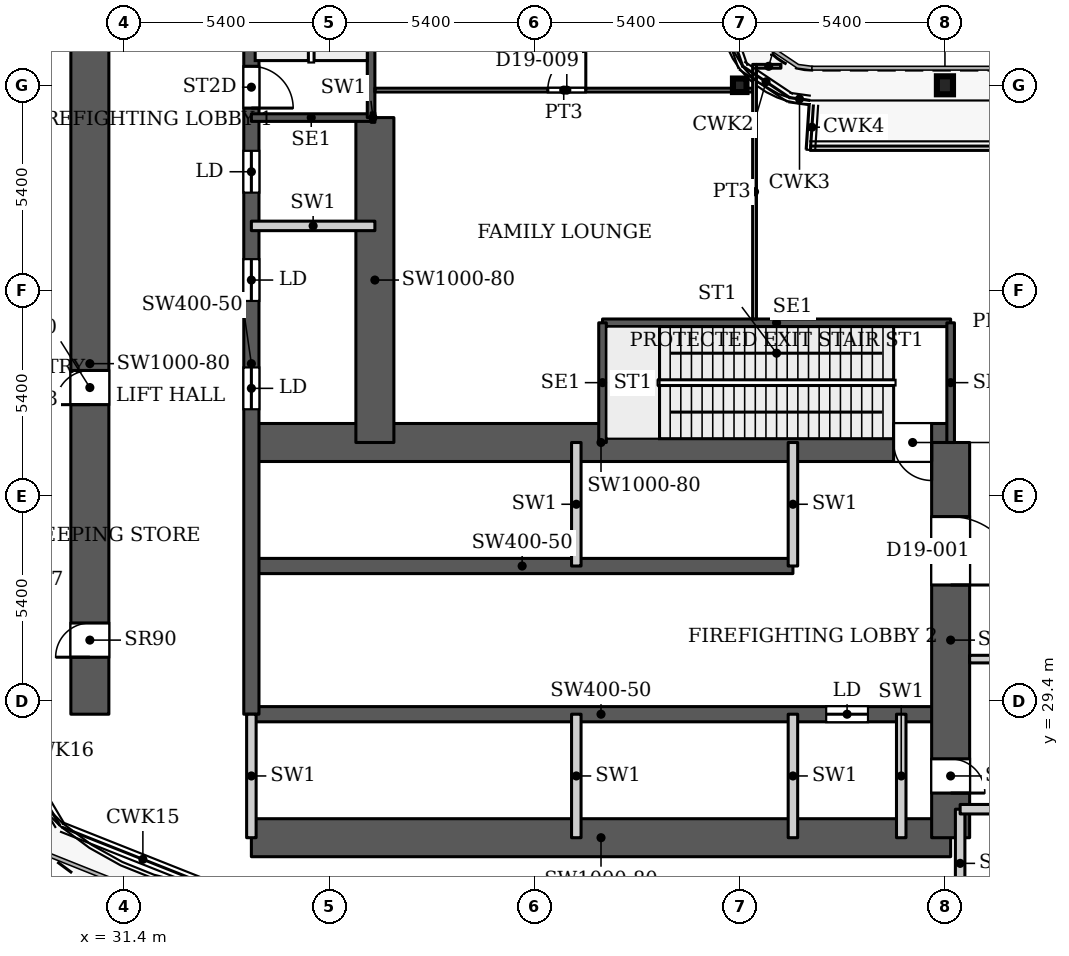
"""IFC4 building model, lengths in metres.
Left out: names, types, materials, properties, quantities, classifications, styles, units other than length and angle.
Written with IfcOpenShell. Run it as: python <this file> out.ifc"""

import sys

from ifc_helpers import new_model, si_unit, direction, frame, frame_2d, origin, origin_2d, place, context, subcontext, project, spatial, rectangle, hollow_rectangle, i_section, extrude, source, transform, mapped, element, fill, save


model = new_model("IFC4")
c1 = context("Model", 3, precision=1e-05, world=origin(), true_north=direction((0.0, 1.0)))
c2 = subcontext(c1, "Body", "Model", "MODEL_VIEW")
j1 = project(units=[si_unit("LENGTHUNIT", "METRE"), si_unit("PLANEANGLEUNIT", "RADIAN")], contexts=[c1])
p1 = place(None, origin())
s1 = spatial("IfcSite", under=j1, at=p1, CompositionType="ELEMENT")
p2 = place(p1, origin())
s2 = spatial("IfcBuilding", under=s1, at=p2, CompositionType="ELEMENT")
p3 = place(p2, frame((0.0, 0.0, 81.2)))
s3 = spatial("IfcBuildingStorey", under=s2, at=p3, CompositionType="ELEMENT", Elevation=81.2)
p4 = place(p3, frame((53.0, 45.6, 0.0), z_axis=(0.0, 0.0, 1.0), x_axis=(1.0, 0.0, 0.0)))
e1 = element("IfcColumn", 1, at=p4, inside=s3, PredefinedType="COLUMN", context=c2, shape_type="SweptSolid", body=[
    extrude(i_section(OverallWidth=0.424, OverallDepth=0.474, WebThickness=0.048, FlangeThickness=0.077, FilletRadius=0.014, at=origin_2d()), origin(), (0.0, 0.0, 1.0), 7.8),
])
p5 = place(p3, frame((47.6, 45.6, 0.0), z_axis=(0.0, 0.0, 1.0), x_axis=(1.0, 0.0, 0.0)))
e2 = element("IfcColumn", 2, at=p5, inside=s3, PredefinedType="COLUMN", context=c2, shape_type="SweptSolid", body=[
    extrude(hollow_rectangle(XDim=0.356, YDim=0.356, WallThickness=0.016, InnerFilletRadius=0.016, OuterFilletRadius=0.032, at=origin_2d()), origin(), (0.0, 0.0, 1.0), 7.8),
])
p6 = place(p3, frame((34.75, 25.8, 0.0), z_axis=(0.0, 0.0, 1.0), x_axis=(1.0, 0.0, 0.0)))
e3 = element("IfcWall", 3, at=p6, inside=s3, PredefinedType="SHEAR", context=c2, shape_type="SweptSolid", body=[
    extrude(rectangle(XDim=18.4, YDim=1.0, at=frame_2d((9.2, 0.0))), origin(), (0.0, 0.0, 1.0), 7.8),
])
p7 = place(p3, frame((34.75, 29.05, 0.0), z_axis=(0.0, 0.0, 1.0), x_axis=(1.0, 0.0, 0.0)))
e4 = element("IfcWall", 4, at=p7, inside=s3, PredefinedType="SHEAR", context=c2, shape_type="SweptSolid", body=[
    extrude(rectangle(XDim=18.4, YDim=0.4, at=frame_2d((9.2, 0.0))), origin(), (0.0, 0.0, 1.0), 7.8),
])
p8 = place(p7, frame((15.125, 0.0, 0.0)))
e5 = element("IfcOpeningElement", 5, at=p8, cuts=e4, PredefinedType="OPENING", context=c2, shape_type="SweptSolid", body=[
    extrude(rectangle(XDim=1.1, YDim=2.2, at=frame_2d((0.55, 1.1))), frame((0.0, 0.21, 0.0), z_axis=(0.0, -1.0, 0.0), x_axis=(1.0, 0.0, 0.0)), (0.0, 0.0, 1.0), 0.42),
])
p9 = place(p3, frame((34.75, 32.95, 0.0), z_axis=(0.0, 0.0, 1.0), x_axis=(1.0, 0.0, 0.0)))
e6 = element("IfcWall", 6, at=p9, inside=s3, PredefinedType="SHEAR", context=c2, shape_type="SweptSolid", body=[
    extrude(rectangle(XDim=14.25, YDim=0.4, at=frame_2d((7.125, 0.0))), origin(), (0.0, 0.0, 1.0), 7.8),
])
p10 = place(p3, frame((34.75, 36.2, 0.0), z_axis=(0.0, 0.0, 1.0), x_axis=(1.0, 0.0, 0.0)))
e7 = element("IfcWall", 7, at=p10, inside=s3, PredefinedType="SHEAR", context=c2, shape_type="SweptSolid", body=[
    extrude(rectangle(XDim=18.4, YDim=1.0, at=frame_2d((9.2, 0.0))), origin(), (0.0, 0.0, 1.0), 7.8),
])
p11 = place(p10, frame((16.9, 0.0, 0.0)))
e8 = element("IfcOpeningElement", 8, at=p11, cuts=e7, PredefinedType="OPENING", context=c2, shape_type="SweptSolid", body=[
    extrude(rectangle(XDim=1.0, YDim=2.2, at=frame_2d((0.5, 1.1))), frame((0.0, 0.51, 0.0), z_axis=(0.0, -1.0, 0.0), x_axis=(1.0, 0.0, 0.0)), (0.0, 0.0, 1.0), 1.02),
])
p12 = place(p3, frame((34.75, 29.05, 0.0), z_axis=(0.0, 0.0, 1.0), x_axis=(0.0, 1.0, 0.0)))
e9 = element("IfcWall", 9, at=p12, inside=s3, PredefinedType="SHEAR", context=c2, shape_type="SweptSolid", body=[
    extrude(rectangle(XDim=18.45, YDim=0.4, at=frame_2d((9.225, 0.0))), origin(), (0.0, 0.0, 1.0), 7.8),
])
p13 = place(p12, frame((8.025, 0.0, 0.0)))
e10 = element("IfcOpeningElement", 10, at=p13, cuts=e9, PredefinedType="OPENING", context=c2, shape_type="SweptSolid", body=[
    extrude(rectangle(XDim=1.1, YDim=2.2, at=frame_2d((0.55, 1.1))), frame((0.0, 0.21, 0.0), z_axis=(0.0, -1.0, 0.0), x_axis=(1.0, 0.0, 0.0)), (0.0, 0.0, 1.0), 0.42),
])
p14 = place(p12, frame((10.875, 0.0, 0.0)))
e11 = element("IfcOpeningElement", 11, at=p14, cuts=e9, PredefinedType="OPENING", context=c2, shape_type="SweptSolid", body=[
    extrude(rectangle(XDim=1.1, YDim=2.2, at=frame_2d((0.55, 1.1))), frame((0.0, 0.21, 0.0), z_axis=(0.0, -1.0, 0.0), x_axis=(1.0, 0.0, 0.0)), (0.0, 0.0, 1.0), 0.42),
])
p15 = place(p12, frame((13.725, 0.0, 0.0)))
e12 = element("IfcOpeningElement", 12, at=p15, cuts=e9, PredefinedType="OPENING", context=c2, shape_type="SweptSolid", body=[
    extrude(rectangle(XDim=1.1, YDim=2.2, at=frame_2d((0.55, 1.1))), frame((0.0, 0.21, 0.0), z_axis=(0.0, -1.0, 0.0), x_axis=(1.0, 0.0, 0.0)), (0.0, 0.0, 1.0), 0.42),
])
p16 = place(p12, frame((15.95, 0.0, 0.0)))
e13 = element("IfcOpeningElement", 13, at=p16, cuts=e9, PredefinedType="OPENING", context=c2, shape_type="SweptSolid", body=[
    extrude(rectangle(XDim=1.1, YDim=2.2, at=frame_2d((0.55, 1.1))), frame((0.0, 0.21, 0.0), z_axis=(0.0, -1.0, 0.0), x_axis=(1.0, 0.0, 0.0)), (0.0, 0.0, 1.0), 0.42),
])
p17 = place(p3, frame((38.0, 36.2, 0.0), z_axis=(0.0, 0.0, 1.0), x_axis=(0.0, 1.0, 0.0)))
e14 = element("IfcWall", 14, at=p17, inside=s3, PredefinedType="SHEAR", context=c2, shape_type="SweptSolid", body=[
    extrude(rectangle(XDim=8.55, YDim=1.0, at=frame_2d((4.275, 0.0))), origin(), (0.0, 0.0, 1.0), 7.8),
])
p18 = place(p3, frame((30.5, 29.05, 0.0), z_axis=(0.0, 0.0, 1.0), x_axis=(0.0, 1.0, 0.0)))
e15 = element("IfcWall", 15, at=p18, inside=s3, PredefinedType="SHEAR", context=c2, shape_type="SweptSolid", body=[
    extrude(rectangle(XDim=18.45, YDim=1.0, at=frame_2d((9.225, 0.0))), origin(), (0.0, 0.0, 1.0), 7.8),
])
p19 = place(p18, frame((1.5, 0.0, 0.0)))
e16 = element("IfcOpeningElement", 16, at=p19, cuts=e15, PredefinedType="OPENING", context=c2, shape_type="SweptSolid", body=[
    extrude(rectangle(XDim=0.9, YDim=2.2, at=frame_2d((0.45, 1.1))), frame((0.0, 0.51, 0.0), z_axis=(0.0, -1.0, 0.0), x_axis=(1.0, 0.0, 0.0)), (0.0, 0.0, 1.0), 1.02),
])
p20 = place(p18, frame((8.146, 0.0, 0.0)))
e17 = element("IfcOpeningElement", 17, at=p20, cuts=e15, PredefinedType="OPENING", context=c2, shape_type="SweptSolid", body=[
    extrude(rectangle(XDim=0.9, YDim=2.2, at=frame_2d((0.45, 1.1))), frame((0.0, 0.51, 0.0), z_axis=(0.0, -1.0, 0.0), x_axis=(1.0, 0.0, 0.0)), (0.0, 0.0, 1.0), 1.02),
])
p21 = place(p3, frame((53.15, 25.8, 0.0), z_axis=(0.0, 0.0, 1.0), x_axis=(0.0, 1.0, 0.0)))
e18 = element("IfcWall", 18, at=p21, inside=s3, PredefinedType="SHEAR", context=c2, shape_type="SweptSolid", body=[
    extrude(rectangle(XDim=10.4, YDim=1.0, at=frame_2d((5.2, 0.0))), origin(), (0.0, 0.0, 1.0), 7.8),
])
p22 = place(p21, frame((1.175, 0.0, 0.0)))
e19 = element("IfcOpeningElement", 19, at=p22, cuts=e18, PredefinedType="OPENING", context=c2, shape_type="SweptSolid", body=[
    extrude(rectangle(XDim=0.9, YDim=2.2, at=frame_2d((0.45, 1.1))), frame((0.0, 0.51, 0.0), z_axis=(0.0, -1.0, 0.0), x_axis=(1.0, 0.0, 0.0)), (0.0, 0.0, 1.0), 1.02),
])
p23 = place(p21, frame((6.65, 0.0, 0.0)))
e20 = element("IfcOpeningElement", 20, at=p23, cuts=e18, PredefinedType="OPENING", context=c2, shape_type="SweptSolid", body=[
    extrude(rectangle(XDim=1.8, YDim=2.1, at=frame_2d((0.9, 1.05))), frame((0.0, 0.51, 0.0), z_axis=(0.0, -1.0, 0.0), x_axis=(1.0, 0.0, 0.0)), (0.0, 0.0, 1.0), 1.02),
])
p24 = place(p3, frame((43.99, 39.35, 0.0), z_axis=(0.0, 0.0, 1.0), x_axis=(1.0, 0.0, 0.0)))
e21 = element("IfcWall", 21, at=p24, inside=s3, PredefinedType="SHEAR", context=c2, shape_type="SweptSolid", body=[
    extrude(rectangle(XDim=9.16, YDim=0.2, at=frame_2d((4.58, 0.0))), origin(), (0.0, 0.0, 1.0), 7.8),
])
for number, where, z_axis, x_axis in (
    (22, (43.99, 36.2, 0.0), (0.0, 0.0, 1.0), (0.0, 1.0, 0.0)),
    (23, (53.15, 36.2, 0.0), (0.0, 0.0, 1.0), (0.0, 1.0, 0.0)),
):
    element("IfcWall", number, at=place(p3, frame(where, z_axis=z_axis, x_axis=x_axis)), inside=s3, PredefinedType="SHEAR", context=c2, shape_type="SweptSolid", body=[
        extrude(rectangle(XDim=3.15, YDim=0.2, at=frame_2d((1.575, 0.0))), origin(), (0.0, 0.0, 1.0), 7.8),
    ])
p25 = place(p3, frame((34.75, 44.75, 0.0), z_axis=(0.0, 0.0, 1.0), x_axis=(1.0, 0.0, 0.0)))
e24 = element("IfcWall", 24, at=p25, inside=s3, PredefinedType="SHEAR", context=c2, shape_type="SweptSolid", body=[
    extrude(rectangle(XDim=3.15, YDim=0.2, at=frame_2d((1.575, 0.0))), origin(), (0.0, 0.0, 1.0), 7.8),
])
p26 = place(p3, frame((37.9, 44.75, 0.0), z_axis=(0.0, 0.0, 1.0), x_axis=(0.0, 1.0, 0.0)))
e25 = element("IfcWall", 25, at=p26, inside=s3, PredefinedType="SHEAR", context=c2, shape_type="SweptSolid", body=[
    extrude(rectangle(XDim=9.16, YDim=0.2, at=frame_2d((4.58, 0.0))), origin(), (0.0, 0.0, 1.0), 7.8),
])
for number, where, z_axis, x_axis in (
    (26, (34.75, 25.8, 0.0), (0.0, 0.0, 1.0), (0.0, 1.0, 0.0)),
    (27, (43.3, 25.8, 0.0), (0.0, 0.0, 1.0), (0.0, 1.0, 0.0)),
    (28, (43.3, 32.95, 0.0), (0.0, 0.0, 1.0), (0.0, 1.0, 0.0)),
    (29, (49.0, 25.8, 0.0), (0.0, 0.0, 1.0), (0.0, 1.0, 0.0)),
    (30, (49.0, 32.95, 0.0), (0.0, 0.0, 1.0), (0.0, 1.0, 0.0)),
    (31, (51.85, 25.8, 0.0), (0.0, 0.0, 1.0), (0.0, 1.0, 0.0)),
):
    element("IfcWall", number, at=place(p3, frame(where, z_axis=z_axis, x_axis=x_axis)), inside=s3, PredefinedType="PARTITIONING", context=c2, shape_type="SweptSolid", body=[
        extrude(rectangle(XDim=3.25, YDim=0.25, at=frame_2d((1.625, 0.0))), origin(), (0.0, 0.0, 1.0), 7.8),
    ])
p27 = place(p3, frame((53.4, 23.7, 0.0), z_axis=(0.0, 0.0, 1.0), x_axis=(0.0, 1.0, 0.0)))
e32 = element("IfcWall", 32, at=p27, inside=s3, PredefinedType="PARTITIONING", context=c2, shape_type="SweptSolid", body=[
    extrude(rectangle(XDim=2.85, YDim=0.25, at=frame_2d((1.425, 0.0))), origin(), (0.0, 0.0, 1.0), 7.8),
])
p28 = place(p3, frame((53.4, 26.55, 0.0), z_axis=(0.0, 0.0, 1.0), x_axis=(1.0, 0.0, 0.0)))
e33 = element("IfcWall", 33, at=p28, inside=s3, PredefinedType="PARTITIONING", context=c2, shape_type="SweptSolid", body=[
    extrude(rectangle(XDim=17.1, YDim=0.25, at=frame_2d((8.55, 0.0))), origin(), (0.0, 0.0, 1.0), 7.8),
])
p29 = place(p28, frame((0.875, 0.0, 0.0)))
e34 = element("IfcOpeningElement", 34, at=p29, cuts=e33, PredefinedType="OPENING", context=c2, shape_type="SweptSolid", body=[
    extrude(rectangle(XDim=1.1, YDim=2.2, at=frame_2d((0.55, 1.1))), frame((0.0, 0.135, 0.0), z_axis=(0.0, -1.0, 0.0), x_axis=(1.0, 0.0, 0.0)), (0.0, 0.0, 1.0), 0.27),
])
p30 = place(p28, frame((3.725, 0.0, 0.0)))
e35 = element("IfcOpeningElement", 35, at=p30, cuts=e33, PredefinedType="OPENING", context=c2, shape_type="SweptSolid", body=[
    extrude(rectangle(XDim=1.1, YDim=2.2, at=frame_2d((0.55, 1.1))), frame((0.0, 0.135, 0.0), z_axis=(0.0, -1.0, 0.0), x_axis=(1.0, 0.0, 0.0)), (0.0, 0.0, 1.0), 0.27),
])
p31 = place(p28, frame((6.575, 0.0, 0.0)))
e36 = element("IfcOpeningElement", 36, at=p31, cuts=e33, PredefinedType="OPENING", context=c2, shape_type="SweptSolid", body=[
    extrude(rectangle(XDim=1.1, YDim=2.2, at=frame_2d((0.55, 1.1))), frame((0.0, 0.135, 0.0), z_axis=(0.0, -1.0, 0.0), x_axis=(1.0, 0.0, 0.0)), (0.0, 0.0, 1.0), 0.27),
])
p32 = place(p28, frame((9.425, 0.0, 0.0)))
e37 = element("IfcOpeningElement", 37, at=p32, cuts=e33, PredefinedType="OPENING", context=c2, shape_type="SweptSolid", body=[
    extrude(rectangle(XDim=1.1, YDim=2.2, at=frame_2d((0.55, 1.1))), frame((0.0, 0.135, 0.0), z_axis=(0.0, -1.0, 0.0), x_axis=(1.0, 0.0, 0.0)), (0.0, 0.0, 1.0), 0.27),
])
p33 = place(p28, frame((12.275, 0.0, 0.0)))
e38 = element("IfcOpeningElement", 38, at=p33, cuts=e33, PredefinedType="OPENING", context=c2, shape_type="SweptSolid", body=[
    extrude(rectangle(XDim=1.1, YDim=2.2, at=frame_2d((0.55, 1.1))), frame((0.0, 0.135, 0.0), z_axis=(0.0, -1.0, 0.0), x_axis=(1.0, 0.0, 0.0)), (0.0, 0.0, 1.0), 0.27),
])
p34 = place(p28, frame((15.125, 0.0, 0.0)))
e39 = element("IfcOpeningElement", 39, at=p34, cuts=e33, PredefinedType="OPENING", context=c2, shape_type="SweptSolid", body=[
    extrude(rectangle(XDim=1.1, YDim=2.2, at=frame_2d((0.55, 1.1))), frame((0.0, 0.135, 0.0), z_axis=(0.0, -1.0, 0.0), x_axis=(1.0, 0.0, 0.0)), (0.0, 0.0, 1.0), 0.27),
])
p35 = place(p3, frame((34.75, 41.9, 0.0), z_axis=(0.0, 0.0, 1.0), x_axis=(1.0, 0.0, 0.0)))
e40 = element("IfcWall", 40, at=p35, inside=s3, PredefinedType="PARTITIONING", context=c2, shape_type="SweptSolid", body=[
    extrude(rectangle(XDim=3.25, YDim=0.25, at=frame_2d((1.625, 0.0))), origin(), (0.0, 0.0, 1.0), 7.8),
])
p36 = place(p3, frame((37.9, 44.75, 0.0), z_axis=(0.0, 0.0, 1.0), x_axis=(1.0, 0.0, 0.0)))
e41 = element("IfcWall", 41, at=p36, inside=s3, PredefinedType="PARTITIONING", context=c2, shape_type="SweptSolid", body=[
    extrude(rectangle(XDim=0.1, YDim=0.25, at=frame_2d((0.05, 0.0))), origin(), (0.0, 0.0, 1.0), 7.8),
])
p37 = place(p3, frame((37.999, 45.473, 0.0), z_axis=(0.0, 0.0, 1.0), x_axis=(1.0, 0.0, 0.0)))
e42 = element("IfcWall", 42, at=p37, inside=s3, PredefinedType="PARTITIONING", context=c2, shape_type="SweptSolid", body=[
    extrude(rectangle(XDim=9.941, YDim=0.1, at=frame_2d((4.97, 0.0))), origin(), (0.0, 0.0, 1.0), 7.5),
])
p38 = place(p37, frame((4.551, 0.0, 0.0)))
e43 = element("IfcOpeningElement", 43, at=p38, cuts=e42, PredefinedType="OPENING", context=c2, shape_type="SweptSolid", body=[
    extrude(rectangle(XDim=1.0, YDim=2.1, at=frame_2d((0.5, 1.05))), frame((0.0, 0.06, 0.0), z_axis=(0.0, -1.0, 0.0), x_axis=(1.0, 0.0, 0.0)), (0.0, 0.0, 1.0), 0.12),
])
p39 = place(p3, frame((47.99, 39.449, 0.0), z_axis=(0.0, 0.0, 1.0), x_axis=(0.0, 1.0, 0.0)))
e44 = element("IfcWall", 44, at=p39, inside=s3, PredefinedType="PARTITIONING", context=c2, shape_type="SweptSolid", body=[
    extrude(rectangle(XDim=6.701, YDim=0.1, at=frame_2d((3.351, 0.0))), origin(), (0.0, 0.0, 1.0), 7.5),
])
p40 = place(p3, frame((48.04, 46.1, 0.0), z_axis=(0.0, 0.0, 1.0), x_axis=(1.0, 0.0, 0.0)))
e45 = element("IfcWall", 45, at=p40, inside=s3, PredefinedType="PARTITIONING", context=c2, shape_type="SweptSolid", body=[
    extrude(rectangle(XDim=0.644, YDim=0.1, at=frame_2d((0.322, 0.0))), origin(), (0.0, 0.0, 1.0), 7.5),
])
p41 = place(p3, frame((53.649, 30.5, 0.0), z_axis=(0.0, 0.0, 1.0), x_axis=(1.0, 0.0, 0.0)))
e46 = element("IfcWall", 46, at=p41, inside=s3, PredefinedType="PARTITIONING", context=c2, shape_type="SweptSolid", body=[
    extrude(rectangle(XDim=25.465, YDim=0.2, at=frame_2d((12.732, 0.0))), origin(), (0.0, 0.0, 1.0), 7.5),
])
p42 = place(p41, frame((8.983, 0.0, 0.0)))
e47 = element("IfcOpeningElement", 47, at=p42, cuts=e46, PredefinedType="OPENING", context=c2, shape_type="SweptSolid", body=[
    extrude(rectangle(XDim=1.8, YDim=2.1, at=frame_2d((0.9, 1.05))), frame((0.0, 0.11, 0.0), z_axis=(0.0, -1.0, 0.0), x_axis=(1.0, 0.0, 0.0)), (0.0, 0.0, 1.0), 0.22),
])
p43 = place(p41, frame((19.341, 0.0, 0.0)))
e48 = element("IfcOpeningElement", 48, at=p43, cuts=e46, PredefinedType="OPENING", context=c2, shape_type="SweptSolid", body=[
    extrude(rectangle(XDim=1.8, YDim=2.1, at=frame_2d((0.9, 1.05))), frame((0.0, 0.11, 0.0), z_axis=(0.0, -1.0, 0.0), x_axis=(1.0, 0.0, 0.0)), (0.0, 0.0, 1.0), 0.22),
])
m1 = source(origin(), c2, "Body", "SweptSolid", [
    extrude(rectangle(XDim=1.1, YDim=2.2, at=frame_2d((0.55, 1.1))), frame((0.0, 0.025, 0.0), z_axis=(0.0, -1.0, 0.0), x_axis=(1.0, 0.0, 0.0)), (0.0, 0.0, 1.0), 0.05),
])
p44 = place(p13, origin())
e49 = element("IfcDoor", 49, at=p44, inside=s3, OperationType="SLIDING_TO_LEFT", PredefinedType="DOOR", context=c2, shape_type="MappedRepresentation", body=[
    mapped(m1, transform((0.0, 0.0, 0.0), x_axis=(1.0, 0.0, 0.0), y_axis=(0.0, 1.0, 0.0), z_axis=(0.0, 0.0, 1.0), scale=1.0)),
])
fill(e10, e49)
p45 = place(p14, origin())
e50 = element("IfcDoor", 50, at=p45, inside=s3, OperationType="SLIDING_TO_LEFT", PredefinedType="DOOR", context=c2, shape_type="MappedRepresentation", body=[
    mapped(m1, transform((0.0, 0.0, 0.0), x_axis=(1.0, 0.0, 0.0), y_axis=(0.0, 1.0, 0.0), z_axis=(0.0, 0.0, 1.0), scale=1.0)),
])
fill(e11, e50)
p46 = place(p15, origin())
e51 = element("IfcDoor", 51, at=p46, inside=s3, OperationType="SLIDING_TO_LEFT", PredefinedType="DOOR", context=c2, shape_type="MappedRepresentation", body=[
    mapped(m1, transform((0.0, 0.0, 0.0), x_axis=(1.0, 0.0, 0.0), y_axis=(0.0, 1.0, 0.0), z_axis=(0.0, 0.0, 1.0), scale=1.0)),
])
fill(e12, e51)
p47 = place(p8, origin())
e52 = element("IfcDoor", 52, at=p47, inside=s3, OperationType="SLIDING_TO_LEFT", PredefinedType="DOOR", context=c2, shape_type="MappedRepresentation", body=[
    mapped(m1, transform((0.0, 0.0, 0.0), x_axis=(1.0, 0.0, 0.0), y_axis=(0.0, 1.0, 0.0), z_axis=(0.0, 0.0, 1.0), scale=1.0)),
])
fill(e5, e52)
m2 = source(origin(), c2, "Body", "SweptSolid", [
    extrude(rectangle(XDim=0.9, YDim=2.2, at=frame_2d((0.45, 1.1))), frame((0.0, 0.025, 0.0), z_axis=(0.0, -1.0, 0.0), x_axis=(1.0, 0.0, 0.0)), (0.0, 0.0, 1.0), 0.05),
])
p48 = place(p19, origin())
e53 = element("IfcDoor", 53, at=p48, inside=s3, OperationType="SINGLE_SWING_LEFT", PredefinedType="DOOR", context=c2, shape_type="MappedRepresentation", body=[
    mapped(m2, transform((0.0, 0.0, 0.0), x_axis=(1.0, 0.0, 0.0), y_axis=(0.0, 1.0, 0.0), z_axis=(0.0, 0.0, 1.0), scale=1.0)),
])
fill(e16, e53)
p49 = place(p20, origin())
e54 = element("IfcDoor", 54, at=p49, inside=s3, OperationType="SINGLE_SWING_LEFT", PredefinedType="DOOR", context=c2, shape_type="MappedRepresentation", body=[
    mapped(m2, transform((0.0, 0.0, 0.0), x_axis=(1.0, 0.0, 0.0), y_axis=(0.0, 1.0, 0.0), z_axis=(0.0, 0.0, 1.0), scale=1.0)),
])
fill(e17, e54)
p50 = place(p22, origin())
e55 = element("IfcDoor", 55, at=p50, inside=s3, OperationType="SINGLE_SWING_RIGHT", PredefinedType="DOOR", context=c2, shape_type="MappedRepresentation", body=[
    mapped(m2, transform((0.0, 0.0, 0.0), x_axis=(1.0, 0.0, 0.0), y_axis=(0.0, 1.0, 0.0), z_axis=(0.0, 0.0, 1.0), scale=1.0)),
])
fill(e19, e55)
m3 = source(origin(), c2, "Body", "SweptSolid", [
    extrude(rectangle(XDim=1.0, YDim=2.2, at=frame_2d((0.5, 1.1))), frame((0.0, 0.025, 0.0), z_axis=(0.0, -1.0, 0.0), x_axis=(1.0, 0.0, 0.0)), (0.0, 0.0, 1.0), 0.05),
])
p51 = place(p11, origin())
e56 = element("IfcDoor", 56, at=p51, inside=s3, OperationType="SINGLE_SWING_RIGHT", PredefinedType="DOOR", context=c2, shape_type="MappedRepresentation", body=[
    mapped(m3, transform((0.0, 0.0, 0.0), x_axis=(1.0, 0.0, 0.0), y_axis=(0.0, 1.0, 0.0), z_axis=(0.0, 0.0, 1.0), scale=1.0)),
])
fill(e8, e56)
m4 = source(origin(), c2, "Body", "SweptSolid", [
    extrude(rectangle(XDim=1.1, YDim=2.2, at=frame_2d((0.55, 1.1))), frame((0.0, 0.025, 0.0), z_axis=(0.0, -1.0, 0.0), x_axis=(1.0, 0.0, 0.0)), (0.0, 0.0, 1.0), 0.05),
])
p52 = place(p16, origin())
e57 = element("IfcDoor", 57, at=p52, inside=s3, OperationType="SINGLE_SWING_RIGHT", PredefinedType="DOOR", context=c2, shape_type="MappedRepresentation", body=[
    mapped(m4, transform((0.0, 0.0, 0.0), x_axis=(1.0, 0.0, 0.0), y_axis=(0.0, 1.0, 0.0), z_axis=(0.0, 0.0, 1.0), scale=1.0)),
])
fill(e13, e57)
m5 = source(origin(), c2, "Body", "SweptSolid", [
    extrude(rectangle(XDim=1.8, YDim=2.1, at=frame_2d((0.9, 1.05))), frame((0.0, 0.025, 0.0), z_axis=(0.0, -1.0, 0.0), x_axis=(1.0, 0.0, 0.0)), (0.0, 0.0, 1.0), 0.05),
])
p53 = place(p23, origin())
e58 = element("IfcDoor", 58, at=p53, inside=s3, OperationType="DOUBLE_DOOR_SINGLE_SWING", PredefinedType="DOOR", context=c2, shape_type="MappedRepresentation", body=[
    mapped(m5, transform((0.0, 0.0, 0.0), x_axis=(1.0, 0.0, 0.0), y_axis=(0.0, 1.0, 0.0), z_axis=(0.0, 0.0, 1.0), scale=1.0)),
])
fill(e20, e58)
m6 = source(origin(), c2, "Body", "SweptSolid", [
    extrude(rectangle(XDim=1.0, YDim=2.1, at=frame_2d((0.5, 1.05))), frame((0.0, 0.025, 0.0), z_axis=(0.0, -1.0, 0.0), x_axis=(1.0, 0.0, 0.0)), (0.0, 0.0, 1.0), 0.05),
])
p54 = place(p38, origin())
e59 = element("IfcDoor", 59, at=p54, inside=s3, OperationType="SINGLE_SWING_LEFT", PredefinedType="DOOR", context=c2, shape_type="MappedRepresentation", body=[
    mapped(m6, transform((0.0, 0.0, 0.0), x_axis=(1.0, 0.0, 0.0), y_axis=(0.0, 1.0, 0.0), z_axis=(0.0, 0.0, 1.0), scale=1.0)),
])
fill(e43, e59)
save(model, sys.argv[1])
